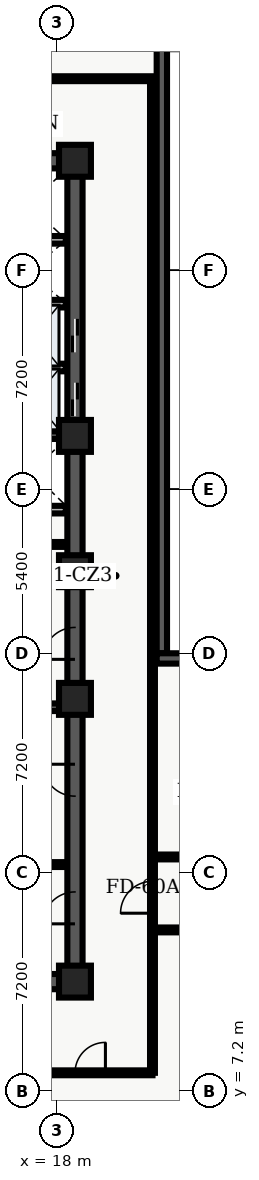
"""IFC4 building model, lengths in metres.
Left out: names, types, materials, properties, quantities, classifications, styles, units other than length and angle.
Written with IfcOpenShell. Run it as: python <this file> out.ifc"""

import sys

from ifc_helpers import new_model, entity, si_unit, converted_unit, direction, frame, origin_with_axes, origin_2d_with_axis, place, context, subcontext, project, spatial, polyline, rectangle, outline, extrude, element, fill, save


model = new_model("IFC4")
c1 = context("Model", 3, precision=1e-05, world=origin_with_axes(), true_north=direction((0.0, 1.0)))
c2 = subcontext(c1, "Body", "Model", "MODEL_VIEW")
j1 = project(units=[si_unit("LENGTHUNIT", "METRE"), converted_unit("PLANEANGLEUNIT", "DEGREE", entity("IfcPlaneAngleMeasure", 0.017), si_unit("PLANEANGLEUNIT", "RADIAN"), dimensions=[0, 0, 0, 0, 0, 0, 0])], contexts=[c1])
p1 = place(None, origin_with_axes())
s1 = spatial("IfcSite", under=j1, at=p1, CompositionType="ELEMENT")
p2 = place(p1, origin_with_axes())
s2 = spatial("IfcBuilding", under=s1, at=p2, CompositionType="ELEMENT")
p3 = place(p2, frame((0.0, 0.0, 129.0), z_axis=(0.0, 0.0, 1.0), x_axis=(1.0, 0.0, 0.0)))
s3 = spatial("IfcBuildingStorey", under=s2, at=p3, CompositionType="ELEMENT", Elevation=129.0)
p4 = place(p3, frame((11.4, 10.8, 0.0), z_axis=(0.0, 0.0, 1.0), x_axis=(1.0, 0.0, 0.0)))
e1 = element("IfcWall", 1, at=p4, inside=s3, PredefinedType="SHEAR", context=c2, shape_type="SweptSolid", body=[
    extrude(outline(polyline([(0.0, -0.25), (7.2, -0.25), (7.2, 0.25), (0.0, 0.25), (0.0, -0.25)])), origin_with_axes(), (0.0, 0.0, 1.0), 3.66),
])
p5 = place(p4, frame((2.625, 0.0, 0.0), z_axis=(0.0, 0.0, 1.0), x_axis=(1.0, 0.0, 0.0)))
e2 = element("IfcOpeningElement", 2, at=p5, cuts=e1, PredefinedType="OPENING", context=c2, shape_type="SweptSolid", body=[
    extrude(rectangle(XDim=1.05, YDim=0.52, at=origin_2d_with_axis()), origin_with_axes(), (0.0, 0.0, 1.0), 2.15),
])
p6 = place(p3, frame((11.4, 37.8, 0.0), z_axis=(0.0, 0.0, 1.0), x_axis=(1.0, 0.0, 0.0)))
e3 = element("IfcWall", 3, at=p6, inside=s3, PredefinedType="SHEAR", context=c2, shape_type="SweptSolid", body=[
    extrude(outline(polyline([(0.0, -0.25), (7.2, -0.25), (7.2, 0.25), (0.0, 0.25), (0.0, -0.25)])), origin_with_axes(), (0.0, 0.0, 1.0), 3.66),
])
p7 = place(p6, frame((2.625, 0.0, 0.0), z_axis=(0.0, 0.0, 1.0), x_axis=(1.0, 0.0, 0.0)))
e4 = element("IfcOpeningElement", 4, at=p7, cuts=e3, PredefinedType="OPENING", context=c2, shape_type="SweptSolid", body=[
    extrude(rectangle(XDim=1.05, YDim=0.52, at=origin_2d_with_axis()), origin_with_axes(), (0.0, 0.0, 1.0), 2.15),
])
p8 = place(p3, frame((18.6, 10.8, 0.0), z_axis=(0.0, 0.0, 1.0), x_axis=(0.0, 1.0, 0.0)))
e5 = element("IfcWall", 5, at=p8, inside=s3, PredefinedType="SHEAR", context=c2, shape_type="SweptSolid", body=[
    extrude(outline(polyline([(0.0, -0.25), (13.5, -0.25), (13.5, 0.25), (0.0, 0.25), (0.0, -0.25)])), origin_with_axes(), (0.0, 0.0, 1.0), 3.66),
])
p9 = place(p8, frame((11.125, 0.0, 0.0), z_axis=(0.0, 0.0, 1.0), x_axis=(1.0, 0.0, 0.0)))
e6 = element("IfcOpeningElement", 6, at=p9, cuts=e5, PredefinedType="OPENING", context=c2, shape_type="SweptSolid", body=[
    extrude(rectangle(XDim=1.05, YDim=0.52, at=origin_2d_with_axis()), origin_with_axes(), (0.0, 0.0, 1.0), 2.15),
])
p10 = place(p8, frame((2.425, 0.0, 0.0), z_axis=(0.0, 0.0, 1.0), x_axis=(1.0, 0.0, 0.0)))
e7 = element("IfcOpeningElement", 7, at=p10, cuts=e5, PredefinedType="OPENING", context=c2, shape_type="SweptSolid", body=[
    extrude(rectangle(XDim=1.05, YDim=0.52, at=origin_2d_with_axis()), origin_with_axes(), (0.0, 0.0, 1.0), 2.15),
])
p11 = place(p8, frame((6.625, 0.0, 0.0), z_axis=(0.0, 0.0, 1.0), x_axis=(1.0, 0.0, 0.0)))
e8 = element("IfcOpeningElement", 8, at=p11, cuts=e5, PredefinedType="OPENING", context=c2, shape_type="SweptSolid", body=[
    extrude(rectangle(XDim=1.05, YDim=0.52, at=origin_2d_with_axis()), origin_with_axes(), (0.0, 0.0, 1.0), 2.15),
])
p12 = place(p3, frame((18.6, 24.3, 0.0), z_axis=(0.0, 0.0, 1.0), x_axis=(0.0, 1.0, 0.0)))
e9 = element("IfcWall", 9, at=p12, inside=s3, PredefinedType="SHEAR", context=c2, shape_type="SweptSolid", body=[
    extrude(outline(polyline([(0.0, -0.25), (13.5, -0.25), (13.5, 0.25), (0.0, 0.25), (0.0, -0.25)])), origin_with_axes(), (0.0, 0.0, 1.0), 3.66),
])
p13 = place(p12, frame((5.65, 0.0, 0.0), z_axis=(0.0, 0.0, 1.0), x_axis=(1.0, 0.0, 0.0)))
e10 = element("IfcOpeningElement", 10, at=p13, cuts=e9, PredefinedType="OPENING", context=c2, shape_type="SweptSolid", body=[
    extrude(rectangle(XDim=1.1, YDim=0.52, at=origin_2d_with_axis()), origin_with_axes(), (0.0, 0.0, 1.0), 2.15),
])
p14 = place(p12, frame((7.75, 0.0, 0.0), z_axis=(0.0, 0.0, 1.0), x_axis=(1.0, 0.0, 0.0)))
e11 = element("IfcOpeningElement", 11, at=p14, cuts=e9, PredefinedType="OPENING", context=c2, shape_type="SweptSolid", body=[
    extrude(rectangle(XDim=1.1, YDim=0.52, at=origin_2d_with_axis()), origin_with_axes(), (0.0, 0.0, 1.0), 2.15),
])
for number, where, z_axis, x_axis in (
    (12, (11.65, 19.825, 0.0), (0.0, 0.0, 1.0), (1.0, 0.0, 0.0)),
    (13, (11.65, 28.775, 0.0), (0.0, 0.0, 1.0), (1.0, 0.0, 0.0)),
):
    element("IfcWall", number, at=place(p3, frame(where, z_axis=z_axis, x_axis=x_axis)), inside=s3, PredefinedType="SHEAR", context=c2, shape_type="SweptSolid", body=[
        extrude(outline(polyline([(0.0, -0.125), (6.7, -0.125), (6.7, 0.125), (0.0, 0.125), (0.0, -0.125)])), origin_with_axes(), (0.0, 0.0, 1.0), 3.66),
    ])
p15 = place(p3, frame((11.7, 24.1, 0.0), z_axis=(0.0, 0.0, 1.0), x_axis=(1.0, 0.0, 0.0)))
e14 = element("IfcWall", 14, at=p15, inside=s3, PredefinedType="SOLIDWALL", context=c2, shape_type="SweptSolid", body=[
    extrude(outline(polyline([(0.0, -0.125), (6.6, -0.125), (6.6, 0.125), (0.0, 0.125), (0.0, -0.125)])), origin_with_axes(), (0.0, 0.0, 1.0), 2.7),
])
p16 = place(p15, frame((3.75, 0.0, 0.0), z_axis=(0.0, 0.0, 1.0), x_axis=(1.0, 0.0, 0.0)))
e15 = element("IfcOpeningElement", 15, at=p16, cuts=e14, PredefinedType="OPENING", context=c2, shape_type="SweptSolid", body=[
    extrude(rectangle(XDim=0.9, YDim=0.27, at=origin_2d_with_axis()), origin_with_axes(), (0.0, 0.0, 1.0), 2.15),
])
p17 = place(p3, frame((11.7, 26.325, 0.0), z_axis=(0.0, 0.0, 1.0), x_axis=(1.0, 0.0, 0.0)))
e16 = element("IfcWall", 16, at=p17, inside=s3, PredefinedType="SOLIDWALL", context=c2, shape_type="SweptSolid", body=[
    extrude(outline(polyline([(0.0, -0.125), (6.6, -0.125), (6.6, 0.125), (0.0, 0.125), (0.0, -0.125)])), origin_with_axes(), (0.0, 0.0, 1.0), 2.7),
])
p18 = place(p17, frame((3.5, 0.0, 0.0), z_axis=(0.0, 0.0, 1.0), x_axis=(1.0, 0.0, 0.0)))
e17 = element("IfcOpeningElement", 17, at=p18, cuts=e16, PredefinedType="OPENING", context=c2, shape_type="SweptSolid", body=[
    extrude(rectangle(XDim=0.9, YDim=0.27, at=origin_2d_with_axis()), origin_with_axes(), (0.0, 0.0, 1.0), 2.15),
])
for number, where, z_axis, x_axis in (
    (18, (18.6, 10.8, 0.0), (0.0, 0.0, 1.0), (1.0, 0.0, 0.0)),
    (19, (18.6, 20.1, 0.0), (0.0, 0.0, 1.0), (1.0, 0.0, 0.0)),
    (20, (18.6, 24.3, 0.0), (0.0, 0.0, 1.0), (1.0, 0.0, 0.0)),
    (21, (18.6, 28.75, 0.0), (0.0, 0.0, 1.0), (1.0, 0.0, 0.0)),
    (22, (18.6, 37.8, 0.0), (0.0, 0.0, 1.0), (1.0, 0.0, 0.0)),
):
    element("IfcColumn", number, at=place(p3, frame(where, z_axis=z_axis, x_axis=x_axis)), inside=s3, PredefinedType="COLUMN", context=c2, shape_type="SweptSolid", body=[
        extrude(rectangle(XDim=1.05, YDim=1.05, at=origin_2d_with_axis()), origin_with_axes(), (0.0, 0.0, 1.0), 3.9),
    ])
p19 = place(p3, frame((14.62, 25.18, 0.0), z_axis=(0.0, 0.0, 1.0), x_axis=(1.0, 0.0, 0.0)))
e23 = element("IfcWall", 23, at=p19, inside=s3, PredefinedType="PARTITIONING", context=c2, shape_type="SweptSolid", body=[
    extrude(outline(polyline([(0.0, -0.08), (3.68, -0.08), (3.68, 0.08), (0.0, 0.08), (0.0, -0.08)])), origin_with_axes(), (0.0, 0.0, 1.0), 2.7),
])
p20 = place(p19, frame((1.95, 0.0, 0.0), z_axis=(0.0, 0.0, 1.0), x_axis=(1.0, 0.0, 0.0)))
e24 = element("IfcOpeningElement", 24, at=p20, cuts=e23, PredefinedType="OPENING", context=c2, shape_type="SweptSolid", body=[
    extrude(rectangle(XDim=0.9, YDim=0.18, at=origin_2d_with_axis()), origin_with_axes(), (0.0, 0.0, 1.0), 2.15),
])
p21 = place(p3, frame((15.84, 14.65, 0.0), z_axis=(0.0, 0.0, 1.0), x_axis=(1.0, 0.0, 0.0)))
e25 = element("IfcWall", 25, at=p21, inside=s3, PredefinedType="PARTITIONING", context=c2, shape_type="SweptSolid", body=[
    extrude(outline(polyline([(0.0, -0.08), (2.46, -0.08), (2.46, 0.08), (0.0, 0.08), (0.0, -0.08)])), origin_with_axes(), (0.0, 0.0, 1.0), 2.7),
])
for number, where, z_axis, x_axis in (
    (26, (15.84, 31.0, 0.0), (0.0, 0.0, 1.0), (1.0, 0.0, 0.0)),
    (27, (15.84, 33.1, 0.0), (0.0, 0.0, 1.0), (1.0, 0.0, 0.0)),
    (28, (15.84, 35.2, 0.0), (0.0, 0.0, 1.0), (1.0, 0.0, 0.0)),
):
    element("IfcWall", number, at=place(p3, frame(where, z_axis=z_axis, x_axis=x_axis)), inside=s3, PredefinedType="SOLIDWALL", context=c2, shape_type="SweptSolid", body=[
        extrude(outline(polyline([(0.0, -0.125), (2.46, -0.125), (2.46, 0.125), (0.0, 0.125), (0.0, -0.125)])), origin_with_axes(), (0.0, 0.0, 1.0), 2.7),
    ])
p22 = place(p3, frame((2.6, 7.8, 0.0), z_axis=(0.0, 0.0, 1.0), x_axis=(1.0, 0.0, 0.0)))
e29 = element("IfcWall", 29, at=p22, inside=s3, PredefinedType="PARTITIONING", context=c2, shape_type="SweptSolid", body=[
    extrude(outline(polyline([(0.0, -0.08), (18.55, -0.08), (18.55, 0.08), (0.0, 0.08), (0.0, -0.08)])), origin_with_axes(), (0.0, 0.0, 1.0), 2.7),
])
p23 = place(p22, frame((1.577, 0.0, 0.0), z_axis=(0.0, 0.0, 1.0), x_axis=(1.0, 0.0, 0.0)))
e30 = element("IfcOpeningElement", 30, at=p23, cuts=e29, PredefinedType="OPENING", context=c2, shape_type="SweptSolid", body=[
    extrude(rectangle(XDim=1.0, YDim=0.18, at=origin_2d_with_axis()), origin_with_axes(), (0.0, 0.0, 1.0), 2.15),
])
p24 = place(p22, frame((6.542, 0.0, 0.0), z_axis=(0.0, 0.0, 1.0), x_axis=(1.0, 0.0, 0.0)))
e31 = element("IfcOpeningElement", 31, at=p24, cuts=e29, PredefinedType="OPENING", context=c2, shape_type="SweptSolid", body=[
    extrude(rectangle(XDim=1.0, YDim=0.18, at=origin_2d_with_axis()), origin_with_axes(), (0.0, 0.0, 1.0), 2.15),
])
p25 = place(p22, frame((11.931, 0.0, 0.0), z_axis=(0.0, 0.0, 1.0), x_axis=(1.0, 0.0, 0.0)))
e32 = element("IfcOpeningElement", 32, at=p25, cuts=e29, PredefinedType="OPENING", context=c2, shape_type="SweptSolid", body=[
    extrude(rectangle(XDim=1.0, YDim=0.18, at=origin_2d_with_axis()), origin_with_axes(), (0.0, 0.0, 1.0), 2.15),
])
p26 = place(p22, frame((16.502, 0.0, 0.0), z_axis=(0.0, 0.0, 1.0), x_axis=(1.0, 0.0, 0.0)))
e33 = element("IfcOpeningElement", 33, at=p26, cuts=e29, PredefinedType="OPENING", context=c2, shape_type="SweptSolid", body=[
    extrude(rectangle(XDim=1.0, YDim=0.18, at=origin_2d_with_axis()), origin_with_axes(), (0.0, 0.0, 1.0), 2.15),
])
p27 = place(p3, frame((2.6, 40.5, 0.0), z_axis=(0.0, 0.0, 1.0), x_axis=(1.0, 0.0, 0.0)))
e34 = element("IfcWall", 34, at=p27, inside=s3, PredefinedType="PARTITIONING", context=c2, shape_type="SweptSolid", body=[
    extrude(outline(polyline([(0.0, -0.08), (18.693, -0.08), (18.693, 0.08), (0.0, 0.08), (0.0, -0.08)])), origin_with_axes(), (0.0, 0.0, 1.0), 2.7),
])
p28 = place(p27, frame((7.744, 0.0, 0.0), z_axis=(0.0, 0.0, 1.0), x_axis=(1.0, 0.0, 0.0)))
e35 = element("IfcOpeningElement", 35, at=p28, cuts=e34, PredefinedType="OPENING", context=c2, shape_type="SweptSolid", body=[
    extrude(rectangle(XDim=1.0, YDim=0.18, at=origin_2d_with_axis()), origin_with_axes(), (0.0, 0.0, 1.0), 2.15),
])
p29 = place(p3, frame((21.15, 7.8, 0.0), z_axis=(0.0, 0.0, 1.0), x_axis=(0.0, 1.0, 0.0)))
e36 = element("IfcWall", 36, at=p29, inside=s3, PredefinedType="PARTITIONING", context=c2, shape_type="SweptSolid", body=[
    extrude(outline(polyline([(0.0, -0.08), (32.7, -0.08), (32.7, 0.08), (0.0, 0.08), (0.0, -0.08)])), origin_with_axes(), (0.0, 0.0, 1.0), 2.7),
])
p30 = place(p29, frame((5.775, 0.0, 0.0), z_axis=(0.0, 0.0, 1.0), x_axis=(1.0, 0.0, 0.0)))
e37 = element("IfcOpeningElement", 37, at=p30, cuts=e36, PredefinedType="OPENING", context=c2, shape_type="SweptSolid", body=[
    extrude(rectangle(XDim=1.05, YDim=0.18, at=origin_2d_with_axis()), origin_with_axes(), (0.0, 0.0, 1.0), 2.15),
])
p31 = place(p3, frame((21.15, 12.5, 0.0), z_axis=(0.0, 0.0, 1.0), x_axis=(1.0, 0.0, 0.0)))
e38 = element("IfcWall", 38, at=p31, inside=s3, PredefinedType="PARTITIONING", context=c2, shape_type="SweptSolid", body=[
    extrude(outline(polyline([(0.0, -0.08), (15.2, -0.08), (15.2, 0.08), (0.0, 0.08), (0.0, -0.08)])), origin_with_axes(), (0.0, 0.0, 1.0), 2.7),
])
p32 = place(p31, frame((2.283, 0.0, 0.0), z_axis=(0.0, 0.0, 1.0), x_axis=(1.0, 0.0, 0.0)))
e39 = element("IfcOpeningElement", 39, at=p32, cuts=e38, PredefinedType="OPENING", context=c2, shape_type="SweptSolid", body=[
    extrude(rectangle(XDim=1.0, YDim=0.18, at=origin_2d_with_axis()), origin_with_axes(), (0.0, 0.0, 1.0), 2.15),
])
p33 = place(p31, frame((6.801, 0.0, 0.0), z_axis=(0.0, 0.0, 1.0), x_axis=(1.0, 0.0, 0.0)))
e40 = element("IfcOpeningElement", 40, at=p33, cuts=e38, PredefinedType="OPENING", context=c2, shape_type="SweptSolid", body=[
    extrude(rectangle(XDim=1.0, YDim=0.18, at=origin_2d_with_axis()), origin_with_axes(), (0.0, 0.0, 1.0), 2.15),
])
p34 = place(p31, frame((12.168, 0.0, 0.0), z_axis=(0.0, 0.0, 1.0), x_axis=(1.0, 0.0, 0.0)))
e41 = element("IfcOpeningElement", 41, at=p34, cuts=e38, PredefinedType="OPENING", context=c2, shape_type="SweptSolid", body=[
    extrude(rectangle(XDim=1.0, YDim=0.18, at=origin_2d_with_axis()), origin_with_axes(), (0.0, 0.0, 1.0), 2.15),
])
p35 = place(p3, frame((21.15, 14.9, 0.0), z_axis=(0.0, 0.0, 1.0), x_axis=(1.0, 0.0, 0.0)))
e42 = element("IfcWall", 42, at=p35, inside=s3, PredefinedType="PARTITIONING", context=c2, shape_type="SweptSolid", body=[
    extrude(outline(polyline([(0.0, -0.08), (15.2, -0.08), (15.2, 0.08), (0.0, 0.08), (0.0, -0.08)])), origin_with_axes(), (0.0, 0.0, 1.0), 2.7),
])
p36 = place(p35, frame((2.564, 0.0, 0.0), z_axis=(0.0, 0.0, 1.0), x_axis=(1.0, 0.0, 0.0)))
e43 = element("IfcOpeningElement", 43, at=p36, cuts=e42, PredefinedType="OPENING", context=c2, shape_type="SweptSolid", body=[
    extrude(rectangle(XDim=1.0, YDim=0.18, at=origin_2d_with_axis()), origin_with_axes(), (0.0, 0.0, 1.0), 2.15),
])
p37 = place(p35, frame((6.465, 0.0, 0.0), z_axis=(0.0, 0.0, 1.0), x_axis=(1.0, 0.0, 0.0)))
e44 = element("IfcOpeningElement", 44, at=p37, cuts=e42, PredefinedType="OPENING", context=c2, shape_type="SweptSolid", body=[
    extrude(rectangle(XDim=1.0, YDim=0.18, at=origin_2d_with_axis()), origin_with_axes(), (0.0, 0.0, 1.0), 2.15),
])
p38 = place(p35, frame((9.65, 0.0, 0.0), z_axis=(0.0, 0.0, 1.0), x_axis=(1.0, 0.0, 0.0)))
e45 = element("IfcOpeningElement", 45, at=p38, cuts=e42, PredefinedType="OPENING", context=c2, shape_type="SweptSolid", body=[
    extrude(rectangle(XDim=1.0, YDim=0.18, at=origin_2d_with_axis()), origin_with_axes(), (0.0, 0.0, 1.0), 2.15),
])
p39 = place(p35, frame((13.219, 0.0, 0.0), z_axis=(0.0, 0.0, 1.0), x_axis=(1.0, 0.0, 0.0)))
e46 = element("IfcOpeningElement", 46, at=p39, cuts=e42, PredefinedType="OPENING", context=c2, shape_type="SweptSolid", body=[
    extrude(rectangle(XDim=1.0, YDim=0.18, at=origin_2d_with_axis()), origin_with_axes(), (0.0, 0.0, 1.0), 2.15),
])
p40 = place(p3, frame((21.458, 46.82, 0.0), z_axis=(0.0, 0.0, 1.0), x_axis=(0.0, -1.0, 0.0)))
e47 = element("IfcWall", 47, at=p40, inside=s3, PredefinedType="SOLIDWALL", context=c2, shape_type="SweptSolid", body=[
    extrude(outline(polyline([(0.0, -0.17), (25.22, -0.17), (25.22, 0.17), (0.0, 0.17), (0.0, -0.17)])), origin_with_axes(), (0.0, 0.0, 1.0), 3.66),
])
p41 = place(p40, frame((3.002, 0.0, 0.45), z_axis=(0.0, 0.0, 1.0), x_axis=(1.0, 0.0, 0.0)))
e48 = element("IfcOpeningElement", 48, at=p41, cuts=e47, PredefinedType="OPENING", context=c2, shape_type="SweptSolid", body=[
    extrude(rectangle(XDim=1.6, YDim=0.36, at=origin_2d_with_axis()), origin_with_axes(), (0.0, 0.0, 1.0), 2.2),
])
p42 = place(p3, frame((21.288, 21.43, 0.0), z_axis=(0.0, 0.0, 1.0), x_axis=(1.0, 0.0, 0.0)))
e49 = element("IfcWall", 49, at=p42, inside=s3, PredefinedType="SOLIDWALL", context=c2, shape_type="SweptSolid", body=[
    extrude(outline(polyline([(0.0, -0.17), (17.112, -0.17), (17.112, 0.17), (0.0, 0.17), (0.0, -0.17)])), origin_with_axes(), (0.0, 0.0, 1.0), 3.66),
])
p43 = place(p42, frame((3.252, 0.0, 0.45), z_axis=(0.0, 0.0, 1.0), x_axis=(1.0, 0.0, 0.0)))
e50 = element("IfcOpeningElement", 50, at=p43, cuts=e49, PredefinedType="OPENING", context=c2, shape_type="SweptSolid", body=[
    extrude(rectangle(XDim=1.8, YDim=0.36, at=origin_2d_with_axis()), origin_with_axes(), (0.0, 0.0, 1.0), 2.1),
])
p44 = place(p42, frame((9.406, 0.0, 0.45), z_axis=(0.0, 0.0, 1.0), x_axis=(1.0, 0.0, 0.0)))
e51 = element("IfcOpeningElement", 51, at=p44, cuts=e49, PredefinedType="OPENING", context=c2, shape_type="SweptSolid", body=[
    extrude(rectangle(XDim=1.8, YDim=0.36, at=origin_2d_with_axis()), origin_with_axes(), (0.0, 0.0, 1.0), 2.1),
])
p45 = place(p42, frame((13.41, 0.0, 0.45), z_axis=(0.0, 0.0, 1.0), x_axis=(1.0, 0.0, 0.0)))
e52 = element("IfcOpeningElement", 52, at=p45, cuts=e49, PredefinedType="OPENING", context=c2, shape_type="SweptSolid", body=[
    extrude(rectangle(XDim=1.8, YDim=0.36, at=origin_2d_with_axis()), origin_with_axes(), (0.0, 0.0, 1.0), 2.1),
])
p46 = place(p12, frame((5.65, 0.0, 0.0), z_axis=(0.0, 0.0, 1.0), x_axis=(1.0, 0.0, 0.0)))
e53 = element("IfcDoor", 53, at=p46, inside=s3, OperationType="SLIDING_TO_LEFT", PredefinedType="DOOR", context=c2, shape_type="SweptSolid", body=[
    extrude(rectangle(XDim=1.1, YDim=0.09, at=origin_2d_with_axis()), origin_with_axes(), (0.0, 0.0, 1.0), 2.15),
])
fill(e10, e53)
p47 = place(p12, frame((7.75, 0.0, 0.0), z_axis=(0.0, 0.0, 1.0), x_axis=(1.0, 0.0, 0.0)))
e54 = element("IfcDoor", 54, at=p47, inside=s3, OperationType="SLIDING_TO_RIGHT", PredefinedType="DOOR", context=c2, shape_type="SweptSolid", body=[
    extrude(rectangle(XDim=1.1, YDim=0.09, at=origin_2d_with_axis()), origin_with_axes(), (0.0, 0.0, 1.0), 2.15),
])
fill(e11, e54)
p48 = place(p8, frame((11.125, 0.0, 0.0), z_axis=(0.0, 0.0, 1.0), x_axis=(1.0, 0.0, 0.0)))
e55 = element("IfcDoor", 55, at=p48, inside=s3, OperationType="SINGLE_SWING_LEFT", PredefinedType="DOOR", context=c2, shape_type="SweptSolid", body=[
    extrude(rectangle(XDim=1.05, YDim=0.09, at=origin_2d_with_axis()), origin_with_axes(), (0.0, 0.0, 1.0), 2.15),
])
fill(e6, e55)
p49 = place(p8, frame((2.425, 0.0, 0.0), z_axis=(0.0, 0.0, 1.0), x_axis=(1.0, 0.0, 0.0)))
e56 = element("IfcDoor", 56, at=p49, inside=s3, OperationType="SINGLE_SWING_LEFT", PredefinedType="DOOR", context=c2, shape_type="SweptSolid", body=[
    extrude(rectangle(XDim=1.05, YDim=0.09, at=origin_2d_with_axis()), origin_with_axes(), (0.0, 0.0, 1.0), 2.15),
])
fill(e7, e56)
p50 = place(p8, frame((6.625, 0.0, 0.0), z_axis=(0.0, 0.0, 1.0), x_axis=(1.0, 0.0, 0.0)))
e57 = element("IfcDoor", 57, at=p50, inside=s3, OperationType="SINGLE_SWING_RIGHT", PredefinedType="DOOR", context=c2, shape_type="SweptSolid", body=[
    extrude(rectangle(XDim=1.05, YDim=0.09, at=origin_2d_with_axis()), origin_with_axes(), (0.0, 0.0, 1.0), 2.15),
])
fill(e8, e57)
p51 = place(p22, frame((16.502, 0.0, 0.0), z_axis=(0.0, 0.0, 1.0), x_axis=(1.0, 0.0, 0.0)))
e58 = element("IfcDoor", 58, at=p51, inside=s3, OperationType="SINGLE_SWING_RIGHT", PredefinedType="DOOR", context=c2, shape_type="SweptSolid", body=[
    extrude(rectangle(XDim=1.0, YDim=0.09, at=origin_2d_with_axis()), origin_with_axes(), (0.0, 0.0, 1.0), 2.15),
])
fill(e33, e58)
p52 = place(p29, frame((5.775, 0.0, 0.0), z_axis=(0.0, 0.0, 1.0), x_axis=(1.0, 0.0, 0.0)))
e59 = element("IfcDoor", 59, at=p52, inside=s3, OperationType="SINGLE_SWING_LEFT", PredefinedType="DOOR", context=c2, shape_type="SweptSolid", body=[
    extrude(rectangle(XDim=1.05, YDim=0.09, at=origin_2d_with_axis()), origin_with_axes(), (0.0, 0.0, 1.0), 2.15),
])
fill(e37, e59)
save(model, sys.argv[1])
